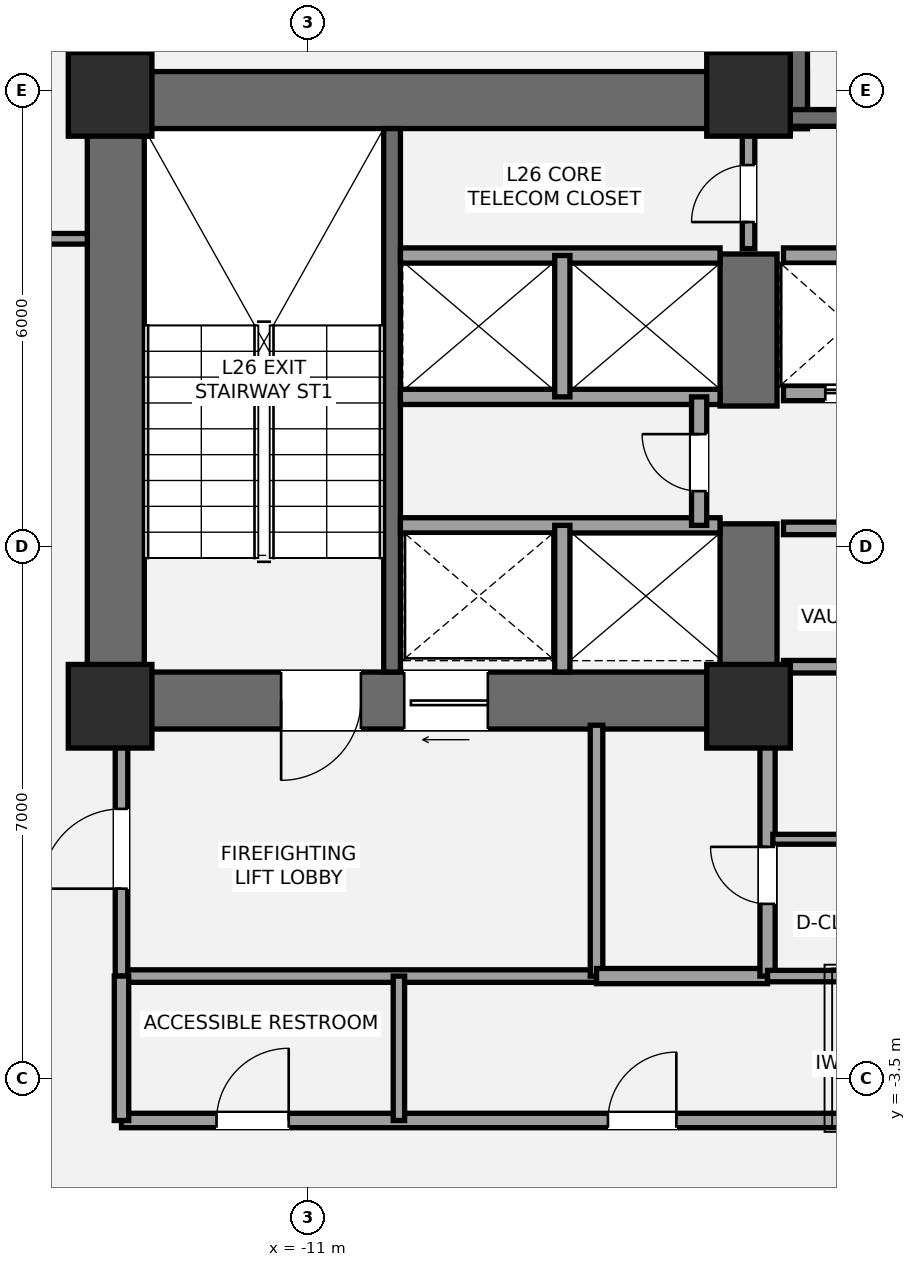
"""IFC4 building model, lengths in metres.
Left out: names, types, materials, properties, quantities, classifications, styles, units other than length and angle.
Written with IfcOpenShell. Run it as: python <this file> out.ifc"""

import sys

from ifc_helpers import new_model, si_unit, direction, frame, frame_2d, origin, origin_2d, place, context, subcontext, project, spatial, rectangle, extrude, element, fill, save


model = new_model("IFC4")
c1 = context("Model", 3, precision=1e-05, world=origin(), true_north=direction((0.0, 1.0)))
c2 = subcontext(c1, "Body", "Model", "MODEL_VIEW")
j1 = project(units=[si_unit("LENGTHUNIT", "METRE"), si_unit("PLANEANGLEUNIT", "RADIAN")], contexts=[c1])
p1 = place(None, origin())
s1 = spatial("IfcSite", under=j1, at=p1, CompositionType="ELEMENT")
p2 = place(p1, origin())
s2 = spatial("IfcBuilding", under=s1, at=p2, CompositionType="ELEMENT")
p3 = place(p2, frame((0.0, 0.0, 100.1)))
s3 = spatial("IfcBuildingStorey", under=s2, at=p3, CompositionType="ELEMENT", Elevation=100.1)
p4 = place(p3, frame((-13.525, 1.1, 0.0), z_axis=(0.0, 0.0, 1.0), x_axis=(0.0, 1.0, 0.0)))
e1 = element("IfcWall", 1, at=p4, inside=s3, PredefinedType="SHEAR", context=c2, shape_type="SweptSolid", body=[
    extrude(rectangle(XDim=8.65, YDim=0.75, at=frame_2d((4.325, 0.0))), origin(), (0.0, 0.0, 1.0), 3.5),
])
p5 = place(p3, frame((-13.9, 9.375, 0.0), z_axis=(0.0, 0.0, 1.0), x_axis=(1.0, 0.0, 0.0)))
e2 = element("IfcWall", 2, at=p5, inside=s3, PredefinedType="SHEAR", context=c2, shape_type="SweptSolid", body=[
    extrude(rectangle(XDim=9.475, YDim=0.75, at=frame_2d((4.737, 0.0))), origin(), (0.0, 0.0, 1.0), 3.5),
])
p6 = place(p3, frame((-4.825, 1.475, 0.0), z_axis=(0.0, 0.0, 1.0), x_axis=(-1.0, 0.0, 0.0)))
e3 = element("IfcWall", 3, at=p6, inside=s3, PredefinedType="SHEAR", context=c2, shape_type="SweptSolid", body=[
    extrude(rectangle(XDim=9.075, YDim=0.75, at=frame_2d((4.538, 0.0))), origin(), (0.0, 0.0, 1.0), 3.5),
])
p7 = place(p6, frame((5.475, 0.0, 0.0)))
e4 = element("IfcOpeningElement", 4, at=p7, cuts=e3, PredefinedType="OPENING", context=c2, shape_type="SweptSolid", body=[
    extrude(rectangle(XDim=1.05, YDim=2.15, at=frame_2d((0.525, 1.075))), frame((0.0, 0.385, 0.0), z_axis=(0.0, -1.0, 0.0), x_axis=(1.0, 0.0, 0.0)), (0.0, 0.0, 1.0), 0.77),
])
p8 = place(p6, frame((3.805, 0.0, 0.0)))
e5 = element("IfcOpeningElement", 5, at=p8, cuts=e3, PredefinedType="OPENING", context=c2, shape_type="SweptSolid", body=[
    extrude(rectangle(XDim=1.1, YDim=2.2, at=frame_2d((0.55, 1.1))), frame((0.0, 0.385, 0.0), z_axis=(0.0, -1.0, 0.0), x_axis=(1.0, 0.0, 0.0)), (0.0, 0.0, 1.0), 0.77),
])
p9 = place(p3, frame((-5.2, 1.1, 0.0), z_axis=(0.0, 0.0, 1.0), x_axis=(0.0, 1.0, 0.0)))
e6 = element("IfcWall", 6, at=p9, inside=s3, PredefinedType="SHEAR", context=c2, shape_type="SweptSolid", body=[
    extrude(rectangle(XDim=2.7, YDim=0.75, at=frame_2d((1.35, 0.0))), origin(), (0.0, 0.0, 1.0), 3.5),
])
p10 = place(p3, frame((-5.2, 5.35, 0.0), z_axis=(0.0, 0.0, 1.0), x_axis=(0.0, 1.0, 0.0)))
e7 = element("IfcWall", 7, at=p10, inside=s3, PredefinedType="SHEAR", context=c2, shape_type="SweptSolid", body=[
    extrude(rectangle(XDim=2.0, YDim=0.75, at=frame_2d((1.0, 0.0))), origin(), (0.0, 0.0, 1.0), 3.5),
])
p11 = place(p3, frame((-9.89, 1.85, 0.0), z_axis=(0.0, 0.0, 1.0), x_axis=(0.0, 1.0, 0.0)))
e8 = element("IfcWall", 8, at=p11, inside=s3, PredefinedType="SHEAR", context=c2, shape_type="SweptSolid", body=[
    extrude(rectangle(XDim=7.15, YDim=0.22, at=frame_2d((3.575, 0.0))), origin(), (0.0, 0.0, 1.0), 3.5),
])
p12 = place(p3, frame((-4.8, 9.0, 0.0), z_axis=(0.0, 0.0, 1.0), x_axis=(0.0, 1.0, 0.0)))
e9 = element("IfcWall", 9, at=p12, inside=s3, PredefinedType="SHEAR", context=c2, shape_type="SweptSolid", body=[
    extrude(rectangle(XDim=4.15, YDim=0.75, at=frame_2d((2.075, 0.0))), origin(), (0.0, 0.0, 1.0), 3.5),
])
p13 = place(p3, frame((-4.7, 9.14, 0.0), z_axis=(0.0, 0.0, 1.0), x_axis=(1.0, 0.0, 0.0)))
e10 = element("IfcWall", 10, at=p13, inside=s3, PredefinedType="SHEAR", context=c2, shape_type="SweptSolid", body=[
    extrude(rectangle(XDim=9.3, YDim=0.22, at=frame_2d((4.65, 0.0))), origin(), (0.0, 0.0, 1.0), 3.5),
])
p14 = place(p13, frame((1.15, 0.0, 0.0)))
e11 = element("IfcOpeningElement", 11, at=p14, cuts=e10, PredefinedType="OPENING", context=c2, shape_type="SweptSolid", body=[
    extrude(rectangle(XDim=1.05, YDim=2.15, at=frame_2d((0.525, 1.075))), frame((0.0, 0.12, 0.0), z_axis=(0.0, -1.0, 0.0), x_axis=(1.0, 0.0, 0.0)), (0.0, 0.0, 1.0), 0.24),
])
for number, where, z_axis, x_axis in (
    (12, (-13.6, 1.4, 0.0), (0.0, 0.0, 1.0), (1.0, 0.0, 0.0)),
    (13, (-13.6, 9.45, 0.0), (0.0, 0.0, 1.0), (1.0, 0.0, 0.0)),
    (14, (-5.2, 1.4, 0.0), (0.0, 0.0, 1.0), (1.0, 0.0, 0.0)),
    (15, (-5.2, 9.45, 0.0), (0.0, 0.0, 1.0), (1.0, 0.0, 0.0)),
):
    element("IfcColumn", number, at=place(p3, frame(where, z_axis=z_axis, x_axis=x_axis)), inside=s3, PredefinedType="COLUMN", context=c2, shape_type="SweptSolid", body=[
        extrude(rectangle(XDim=1.1, YDim=1.1, at=origin_2d()), origin(), (0.0, 0.0, 1.0), 3.5),
    ])
p15 = place(p3, frame((-13.45, -2.15, 0.0), z_axis=(0.0, 0.0, 1.0), x_axis=(1.0, 0.0, 0.0)))
e16 = element("IfcWall", 16, at=p15, inside=s3, PredefinedType="PARTITIONING", context=c2, shape_type="SweptSolid", body=[
    extrude(rectangle(XDim=6.25, YDim=0.165, at=frame_2d((3.125, 0.0))), origin(), (0.0, 0.0, 1.0), 2.763),
])
p16 = place(p3, frame((-13.45, -2.15, 0.0), z_axis=(0.0, 0.0, 1.0), x_axis=(0.0, 1.0, 0.0)))
e17 = element("IfcWall", 17, at=p16, inside=s3, PredefinedType="PARTITIONING", context=c2, shape_type="SweptSolid", body=[
    extrude(rectangle(XDim=3.3, YDim=0.165, at=frame_2d((1.65, 0.0))), origin(), (0.0, 0.0, 1.0), 2.763),
])
p17 = place(p16, frame((1.15, 0.0, 0.0)))
e18 = element("IfcOpeningElement", 18, at=p17, cuts=e17, PredefinedType="OPENING", context=c2, shape_type="SweptSolid", body=[
    extrude(rectangle(XDim=1.05, YDim=2.15, at=frame_2d((0.525, 1.075))), frame((0.0, 0.093, 0.0), z_axis=(0.0, -1.0, 0.0), x_axis=(1.0, 0.0, 0.0)), (0.0, 0.0, 1.0), 0.185),
])
p18 = place(p3, frame((-7.2, -2.15, 0.0), z_axis=(0.0, 0.0, 1.0), x_axis=(0.0, 1.0, 0.0)))
e19 = element("IfcWall", 19, at=p18, inside=s3, PredefinedType="PARTITIONING", context=c2, shape_type="SweptSolid", body=[
    extrude(rectangle(XDim=3.3, YDim=0.165, at=frame_2d((1.65, 0.0))), origin(), (0.0, 0.0, 1.0), 2.763),
])
p19 = place(p3, frame((-7.2, -2.15, 0.0), z_axis=(0.0, 0.0, 1.0), x_axis=(1.0, 0.0, 0.0)))
e20 = element("IfcWall", 20, at=p19, inside=s3, PredefinedType="SOLIDWALL", context=c2, shape_type="SweptSolid", body=[
    extrude(rectangle(XDim=2.25, YDim=0.2, at=frame_2d((1.125, 0.0))), origin(), (0.0, 0.0, 1.0), 2.763),
])
p20 = place(p3, frame((-4.95, -2.15, 0.0), z_axis=(0.0, 0.0, 1.0), x_axis=(0.0, 1.0, 0.0)))
e21 = element("IfcWall", 21, at=p20, inside=s3, PredefinedType="SOLIDWALL", context=c2, shape_type="SweptSolid", body=[
    extrude(rectangle(XDim=3.3, YDim=0.2, at=frame_2d((1.65, 0.0))), origin(), (0.0, 0.0, 1.0), 2.763),
])
p21 = place(p20, frame((0.95, 0.0, 0.0)))
e22 = element("IfcOpeningElement", 22, at=p21, cuts=e21, PredefinedType="OPENING", context=c2, shape_type="SweptSolid", body=[
    extrude(rectangle(XDim=0.75, YDim=2.1, at=frame_2d((0.375, 1.05))), frame((0.0, 0.11, 0.0), z_axis=(0.0, -1.0, 0.0), x_axis=(1.0, 0.0, 0.0)), (0.0, 0.0, 1.0), 0.22),
])
p22 = place(p3, frame((-4.88, -0.35, 0.0), z_axis=(0.0, 0.0, 1.0), x_axis=(1.0, 0.0, 0.0)))
e23 = element("IfcWall", 23, at=p22, inside=s3, PredefinedType="PARTITIONING", context=c2, shape_type="SweptSolid", body=[
    extrude(rectangle(XDim=2.73, YDim=0.13, at=frame_2d((1.365, 0.0))), origin(), (0.0, 0.0, 1.0), 2.763),
])
p23 = place(p22, frame((0.85, 0.0, 0.0)))
e24 = element("IfcOpeningElement", 24, at=p23, cuts=e23, PredefinedType="OPENING", context=c2, shape_type="SweptSolid", body=[
    extrude(rectangle(XDim=0.78, YDim=2.1, at=frame_2d((0.39, 1.05))), frame((0.0, 0.075, 0.0), z_axis=(0.0, -1.0, 0.0), x_axis=(1.0, 0.0, 0.0)), (0.0, 0.0, 1.0), 0.15),
])
p24 = place(p3, frame((-9.78, 3.78, 0.0), z_axis=(0.0, 0.0, 1.0), x_axis=(1.0, 0.0, 0.0)))
e25 = element("IfcWall", 25, at=p24, inside=s3, PredefinedType="SOLIDWALL", context=c2, shape_type="SweptSolid", body=[
    extrude(rectangle(XDim=4.205, YDim=0.2, at=frame_2d((2.103, 0.0))), origin(), (0.0, 0.0, 1.0), 3.31),
])
p25 = place(p3, frame((-7.65, 1.85, 0.0), z_axis=(0.0, 0.0, 1.0), x_axis=(0.0, 1.0, 0.0)))
e26 = element("IfcWall", 26, at=p25, inside=s3, PredefinedType="SOLIDWALL", context=c2, shape_type="SweptSolid", body=[
    extrude(rectangle(XDim=1.93, YDim=0.2, at=frame_2d((0.965, 0.0))), origin(), (0.0, 0.0, 1.0), 3.31),
])
for number, where, z_axis, x_axis in (
    (27, (-9.78, 5.47, 0.0), (0.0, 0.0, 1.0), (1.0, 0.0, 0.0)),
    (28, (-9.78, 7.33, 0.0), (0.0, 0.0, 1.0), (1.0, 0.0, 0.0)),
):
    element("IfcWall", number, at=place(p3, frame(where, z_axis=z_axis, x_axis=x_axis)), inside=s3, PredefinedType="SOLIDWALL", context=c2, shape_type="SweptSolid", body=[
        extrude(rectangle(XDim=4.205, YDim=0.2, at=frame_2d((2.103, 0.0))), origin(), (0.0, 0.0, 1.0), 3.31),
    ])
p26 = place(p3, frame((-7.65, 5.47, 0.0), z_axis=(0.0, 0.0, 1.0), x_axis=(0.0, 1.0, 0.0)))
e29 = element("IfcWall", 29, at=p26, inside=s3, PredefinedType="SOLIDWALL", context=c2, shape_type="SweptSolid", body=[
    extrude(rectangle(XDim=1.86, YDim=0.2, at=frame_2d((0.93, 0.0))), origin(), (0.0, 0.0, 1.0), 3.31),
])
p27 = place(p3, frame((-5.85, 3.78, 0.0), z_axis=(0.0, 0.0, 1.0), x_axis=(0.0, 1.0, 0.0)))
e30 = element("IfcWall", 30, at=p27, inside=s3, PredefinedType="SOLIDWALL", context=c2, shape_type="SweptSolid", body=[
    extrude(rectangle(XDim=1.69, YDim=0.2, at=frame_2d((0.845, 0.0))), origin(), (0.0, 0.0, 1.0), 3.31),
])
p28 = place(p27, frame((0.45, 0.0, 0.0)))
e31 = element("IfcOpeningElement", 31, at=p28, cuts=e30, PredefinedType="OPENING", context=c2, shape_type="SweptSolid", body=[
    extrude(rectangle(XDim=0.75, YDim=2.1, at=frame_2d((0.375, 1.05))), frame((0.0, 0.11, 0.0), z_axis=(0.0, -1.0, 0.0), x_axis=(1.0, 0.0, 0.0)), (0.0, 0.0, 1.0), 0.22),
])
p29 = place(p3, frame((-4.74, 1.92, 0.0), z_axis=(0.0, 0.0, 1.0), x_axis=(1.0, 0.0, 0.0)))
e32 = element("IfcWall", 32, at=p29, inside=s3, PredefinedType="PARTITIONING", context=c2, shape_type="SweptSolid", body=[
    extrude(rectangle(XDim=3.89, YDim=0.165, at=frame_2d((1.945, 0.0))), origin(), (0.0, 0.0, 1.0), 2.3),
])
p30 = place(p3, frame((-4.74, 3.74, 0.0), z_axis=(0.0, 0.0, 1.0), x_axis=(1.0, 0.0, 0.0)))
e33 = element("IfcWall", 33, at=p30, inside=s3, PredefinedType="PARTITIONING", context=c2, shape_type="SweptSolid", body=[
    extrude(rectangle(XDim=3.89, YDim=0.165, at=frame_2d((1.945, 0.0))), origin(), (0.0, 0.0, 1.0), 3.31),
])
p31 = place(p30, frame((1.6, 0.0, 0.0)))
e34 = element("IfcOpeningElement", 34, at=p31, cuts=e33, PredefinedType="OPENING", context=c2, shape_type="SweptSolid", body=[
    extrude(rectangle(XDim=0.85, YDim=2.1, at=frame_2d((0.425, 1.05))), frame((0.0, 0.093, 0.0), z_axis=(0.0, -1.0, 0.0), x_axis=(1.0, 0.0, 0.0)), (0.0, 0.0, 1.0), 0.185),
])
p32 = place(p3, frame((-4.74, 5.52, 0.0), z_axis=(0.0, 0.0, 1.0), x_axis=(1.0, 0.0, 0.0)))
e35 = element("IfcWall", 35, at=p32, inside=s3, PredefinedType="SOLIDWALL", context=c2, shape_type="SweptSolid", body=[
    extrude(rectangle(XDim=3.86, YDim=0.2, at=frame_2d((1.93, 0.0))), origin(), (0.0, 0.0, 1.0), 3.31),
])
p33 = place(p32, frame((0.55, 0.0, 0.0)))
e36 = element("IfcOpeningElement", 36, at=p33, cuts=e35, PredefinedType="OPENING", context=c2, shape_type="SweptSolid", body=[
    extrude(rectangle(XDim=1.1, YDim=2.2, at=frame_2d((0.55, 1.1))), frame((0.0, 0.11, 0.0), z_axis=(0.0, -1.0, 0.0), x_axis=(1.0, 0.0, 0.0)), (0.0, 0.0, 1.0), 0.22),
])
p34 = place(p32, frame((2.3, 0.0, 0.0)))
e37 = element("IfcOpeningElement", 37, at=p34, cuts=e35, PredefinedType="OPENING", context=c2, shape_type="SweptSolid", body=[
    extrude(rectangle(XDim=1.1, YDim=2.2, at=frame_2d((0.55, 1.1))), frame((0.0, 0.11, 0.0), z_axis=(0.0, -1.0, 0.0), x_axis=(1.0, 0.0, 0.0)), (0.0, 0.0, 1.0), 0.22),
])
p35 = place(p3, frame((-4.74, 7.33, 0.0), z_axis=(0.0, 0.0, 1.0), x_axis=(1.0, 0.0, 0.0)))
e38 = element("IfcWall", 38, at=p35, inside=s3, PredefinedType="SOLIDWALL", context=c2, shape_type="SweptSolid", body=[
    extrude(rectangle(XDim=3.86, YDim=0.2, at=frame_2d((1.93, 0.0))), origin(), (0.0, 0.0, 1.0), 3.31),
])
p36 = place(p3, frame((-5.2, 7.42, 0.0), z_axis=(0.0, 0.0, 1.0), x_axis=(0.0, 1.0, 0.0)))
e39 = element("IfcWall", 39, at=p36, inside=s3, PredefinedType="PARTITIONING", context=c2, shape_type="SweptSolid", body=[
    extrude(rectangle(XDim=1.58, YDim=0.165, at=frame_2d((0.79, 0.0))), origin(), (0.0, 0.0, 1.0), 3.31),
])
p37 = place(p36, frame((0.35, 0.0, 0.0)))
e40 = element("IfcOpeningElement", 40, at=p37, cuts=e39, PredefinedType="OPENING", context=c2, shape_type="SweptSolid", body=[
    extrude(rectangle(XDim=0.75, YDim=2.1, at=frame_2d((0.375, 1.05))), frame((0.0, 0.093, 0.0), z_axis=(0.0, -1.0, 0.0), x_axis=(1.0, 0.0, 0.0)), (0.0, 0.0, 1.0), 0.185),
])
p38 = place(p3, frame((-13.45, -4.05, 0.0), z_axis=(0.0, 0.0, 1.0), x_axis=(1.0, 0.0, 0.0)))
e41 = element("IfcWall", 41, at=p38, inside=s3, PredefinedType="PLUMBINGWALL", context=c2, shape_type="SweptSolid", body=[
    extrude(rectangle(XDim=11.35, YDim=0.19, at=frame_2d((5.675, 0.0))), origin(), (0.0, 0.0, 1.0), 2.763),
])
p39 = place(p38, frame((1.25, 0.0, 0.0)))
e42 = element("IfcOpeningElement", 42, at=p39, cuts=e41, PredefinedType="OPENING", context=c2, shape_type="SweptSolid", body=[
    extrude(rectangle(XDim=0.95, YDim=2.15, at=frame_2d((0.475, 1.075))), frame((0.0, 0.105, 0.0), z_axis=(0.0, -1.0, 0.0), x_axis=(1.0, 0.0, 0.0)), (0.0, 0.0, 1.0), 0.21),
])
p40 = place(p38, frame((6.4, 0.0, 0.0)))
e43 = element("IfcOpeningElement", 43, at=p40, cuts=e41, PredefinedType="OPENING", context=c2, shape_type="SweptSolid", body=[
    extrude(rectangle(XDim=0.9, YDim=2.1, at=frame_2d((0.45, 1.05))), frame((0.0, 0.105, 0.0), z_axis=(0.0, -1.0, 0.0), x_axis=(1.0, 0.0, 0.0)), (0.0, 0.0, 1.0), 0.21),
])
p41 = place(p3, frame((-4.95, -2.15, 0.0), z_axis=(0.0, 0.0, 1.0), x_axis=(1.0, 0.0, 0.0)))
e44 = element("IfcWall", 44, at=p41, inside=s3, PredefinedType="PLUMBINGWALL", context=c2, shape_type="SweptSolid", body=[
    extrude(rectangle(XDim=2.85, YDim=0.15, at=frame_2d((1.425, 0.0))), origin(), (0.0, 0.0, 1.0), 2.763),
])
p42 = place(p3, frame((-13.45, -4.05, 0.0), z_axis=(0.0, 0.0, 1.0), x_axis=(0.0, 1.0, 0.0)))
e45 = element("IfcWall", 45, at=p42, inside=s3, PredefinedType="PLUMBINGWALL", context=c2, shape_type="SweptSolid", body=[
    extrude(rectangle(XDim=1.9, YDim=0.19, at=frame_2d((0.95, 0.0))), origin(), (0.0, 0.0, 1.0), 2.763),
])
p43 = place(p3, frame((-9.8, -4.05, 0.0), z_axis=(0.0, 0.0, 1.0), x_axis=(0.0, 1.0, 0.0)))
e46 = element("IfcWall", 46, at=p43, inside=s3, PredefinedType="PLUMBINGWALL", context=c2, shape_type="SweptSolid", body=[
    extrude(rectangle(XDim=1.9, YDim=0.15, at=frame_2d((0.95, 0.0))), origin(), (0.0, 0.0, 1.0), 3.31),
])
p44 = place(p3, frame((-17.5, 7.55, 0.0), z_axis=(0.0, 0.0, 1.0), x_axis=(1.0, 0.0, 0.0)))
e47 = element("IfcWall", 47, at=p44, inside=s3, PredefinedType="PARTITIONING", context=c2, shape_type="SweptSolid", body=[
    extrude(rectangle(XDim=3.6, YDim=0.14, at=frame_2d((1.8, 0.0))), origin(), (0.0, 0.0, 1.0), 3.31),
])
p45 = place(p44, frame((0.32, 0.0, 0.0)))
e48 = element("IfcOpeningElement", 48, at=p45, cuts=e47, PredefinedType="OPENING", context=c2, shape_type="SweptSolid", body=[
    extrude(rectangle(XDim=0.92, YDim=2.15, at=frame_2d((0.46, 1.075))), frame((0.0, 0.08, 0.0), z_axis=(0.0, -1.0, 0.0), x_axis=(1.0, 0.0, 0.0)), (0.0, 0.0, 1.0), 0.16),
])
p46 = place(p7, origin())
e49 = element("IfcDoor", 49, at=p46, inside=s3, OperationType="SINGLE_SWING_RIGHT", PredefinedType="DOOR", context=c2, shape_type="SweptSolid", body=[
    extrude(rectangle(XDim=1.05, YDim=2.15, at=frame_2d((0.525, 1.075))), frame((0.0, 0.025, 0.0), z_axis=(0.0, -1.0, 0.0), x_axis=(1.0, 0.0, 0.0)), (0.0, 0.0, 1.0), 0.05),
])
fill(e4, e49)
p47 = place(p17, origin())
e50 = element("IfcDoor", 50, at=p47, inside=s3, OperationType="SINGLE_SWING_LEFT", PredefinedType="DOOR", context=c2, shape_type="SweptSolid", body=[
    extrude(rectangle(XDim=1.05, YDim=2.15, at=frame_2d((0.525, 1.075))), frame((0.0, 0.025, 0.0), z_axis=(0.0, -1.0, 0.0), x_axis=(1.0, 0.0, 0.0)), (0.0, 0.0, 1.0), 0.05),
])
fill(e18, e50)
p48 = place(p21, origin())
e51 = element("IfcDoor", 51, at=p48, inside=s3, OperationType="SINGLE_SWING_RIGHT", PredefinedType="DOOR", context=c2, shape_type="SweptSolid", body=[
    extrude(rectangle(XDim=0.75, YDim=2.1, at=frame_2d((0.375, 1.05))), frame((0.0, 0.025, 0.0), z_axis=(0.0, -1.0, 0.0), x_axis=(1.0, 0.0, 0.0)), (0.0, 0.0, 1.0), 0.05),
])
fill(e22, e51)
p49 = place(p8, origin())
e52 = element("IfcDoor", 52, at=p49, inside=s3, OperationType="SLIDING_TO_LEFT", PredefinedType="DOOR", context=c2, shape_type="SweptSolid", body=[
    extrude(rectangle(XDim=1.1, YDim=2.2, at=frame_2d((0.55, 1.1))), frame((0.0, 0.025, 0.0), z_axis=(0.0, -1.0, 0.0), x_axis=(1.0, 0.0, 0.0)), (0.0, 0.0, 1.0), 0.05),
])
fill(e5, e52)
p50 = place(p28, origin())
e53 = element("IfcDoor", 53, at=p50, inside=s3, OperationType="SINGLE_SWING_RIGHT", PredefinedType="DOOR", context=c2, shape_type="SweptSolid", body=[
    extrude(rectangle(XDim=0.75, YDim=2.1, at=frame_2d((0.375, 1.05))), frame((0.0, 0.025, 0.0), z_axis=(0.0, -1.0, 0.0), x_axis=(1.0, 0.0, 0.0)), (0.0, 0.0, 1.0), 0.05),
])
fill(e31, e53)
p51 = place(p33, origin())
e54 = element("IfcDoor", 54, at=p51, inside=s3, OperationType="SLIDING_TO_LEFT", PredefinedType="DOOR", context=c2, shape_type="SweptSolid", body=[
    extrude(rectangle(XDim=1.1, YDim=2.2, at=frame_2d((0.55, 1.1))), frame((0.0, 0.025, 0.0), z_axis=(0.0, -1.0, 0.0), x_axis=(1.0, 0.0, 0.0)), (0.0, 0.0, 1.0), 0.05),
])
fill(e36, e54)
p52 = place(p37, origin())
e55 = element("IfcDoor", 55, at=p52, inside=s3, OperationType="SINGLE_SWING_LEFT", PredefinedType="DOOR", context=c2, shape_type="SweptSolid", body=[
    extrude(rectangle(XDim=0.75, YDim=2.1, at=frame_2d((0.375, 1.05))), frame((0.0, 0.025, 0.0), z_axis=(0.0, -1.0, 0.0), x_axis=(1.0, 0.0, 0.0)), (0.0, 0.0, 1.0), 0.05),
])
fill(e40, e55)
p53 = place(p39, origin())
e56 = element("IfcDoor", 56, at=p53, inside=s3, OperationType="SINGLE_SWING_RIGHT", PredefinedType="DOOR", context=c2, shape_type="SweptSolid", body=[
    extrude(rectangle(XDim=0.95, YDim=2.15, at=frame_2d((0.475, 1.075))), frame((0.0, 0.025, 0.0), z_axis=(0.0, -1.0, 0.0), x_axis=(1.0, 0.0, 0.0)), (0.0, 0.0, 1.0), 0.05),
])
fill(e42, e56)
p54 = place(p40, origin())
e57 = element("IfcDoor", 57, at=p54, inside=s3, OperationType="SINGLE_SWING_RIGHT", PredefinedType="DOOR", context=c2, shape_type="SweptSolid", body=[
    extrude(rectangle(XDim=0.9, YDim=2.1, at=frame_2d((0.45, 1.05))), frame((0.0, 0.025, 0.0), z_axis=(0.0, -1.0, 0.0), x_axis=(1.0, 0.0, 0.0)), (0.0, 0.0, 1.0), 0.05),
])
fill(e43, e57)
save(model, sys.argv[1])
